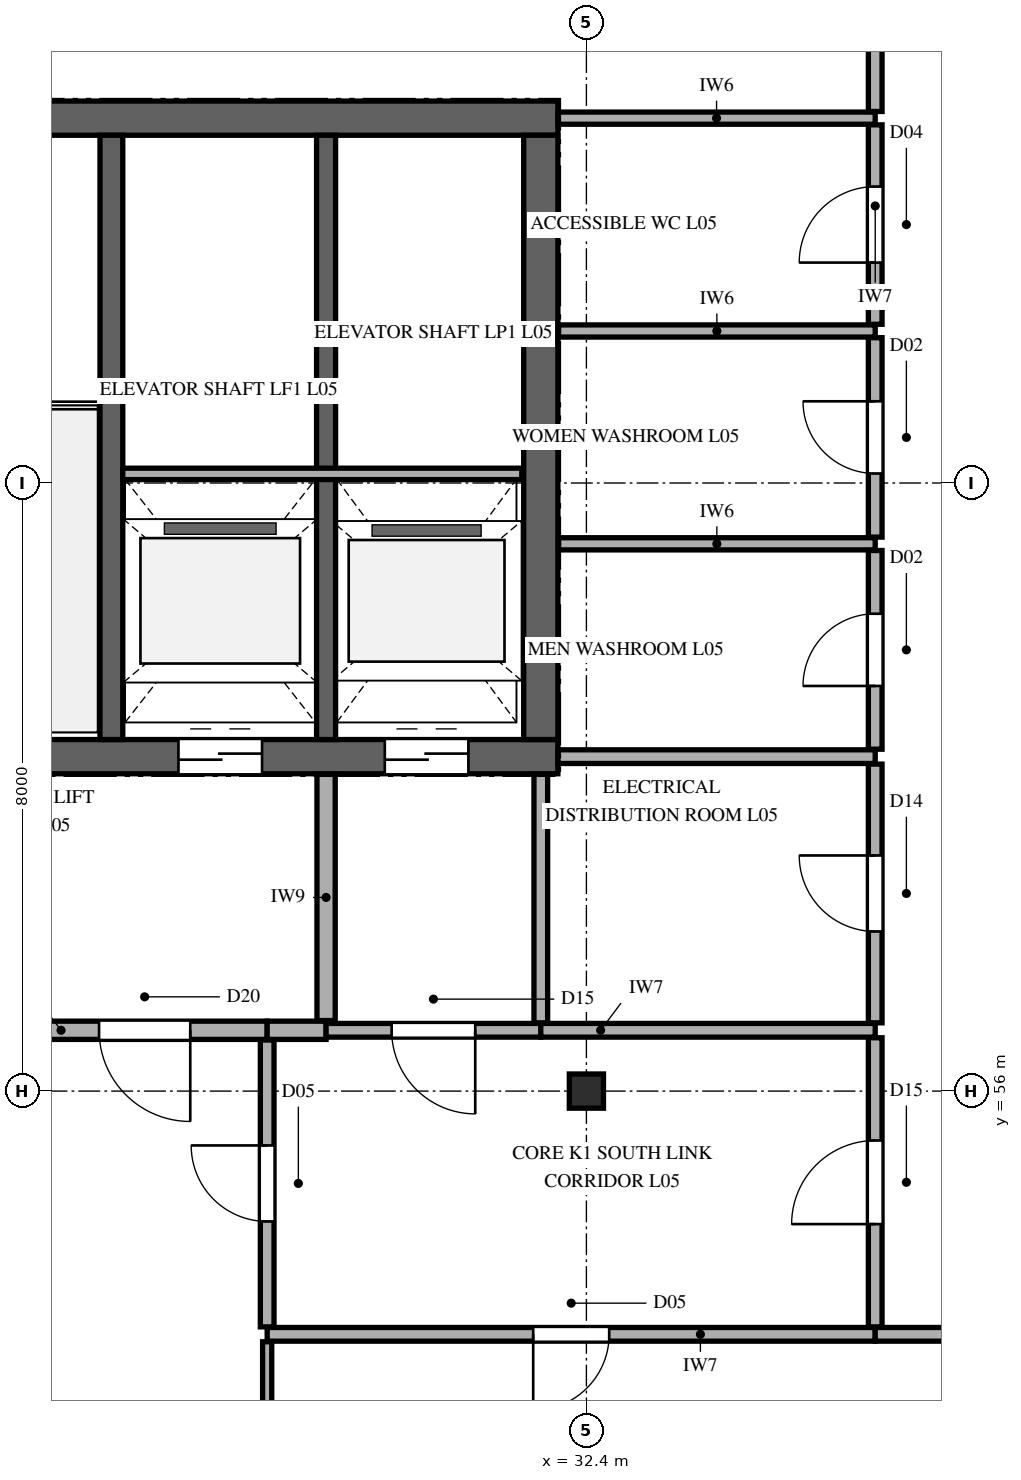
"""IFC4 building model, lengths in metres.
Left out: names, types, materials, properties, quantities, classifications, styles, units other than length and angle.
Written with IfcOpenShell. Run it as: python <this file> out.ifc"""

import sys

from ifc_helpers import new_model, si_unit, direction, frame, frame_2d, origin, origin_2d, place, context, subcontext, project, spatial, rectangle, extrude, element, fill, save


model = new_model("IFC4")
c1 = context("Model", 3, precision=1e-05, world=origin(), true_north=direction((0.0, 1.0)))
c2 = subcontext(c1, "Body", "Model", "MODEL_VIEW")
j1 = project(units=[si_unit("LENGTHUNIT", "METRE"), si_unit("PLANEANGLEUNIT", "RADIAN")], contexts=[c1])
p1 = place(None, origin())
s1 = spatial("IfcSite", under=j1, at=p1, CompositionType="ELEMENT")
p2 = place(p1, origin())
s2 = spatial("IfcBuilding", under=s1, at=p2, CompositionType="ELEMENT")
p3 = place(p2, frame((0.0, 0.0, 24.9)))
s3 = spatial("IfcBuildingStorey", under=s2, at=p3, CompositionType="ELEMENT", Elevation=24.9)
p4 = place(p3, frame((16.36, 60.4, 0.0), z_axis=(0.0, 0.0, 1.0), x_axis=(1.0, 0.0, 0.0)))
e1 = element("IfcWall", 1, at=p4, inside=s3, PredefinedType="SHEAR", context=c2, shape_type="SweptSolid", body=[
    extrude(rectangle(XDim=15.665, YDim=0.45, at=frame_2d((7.833, 0.0))), origin(), (0.0, 0.0, 1.0), 4.2),
])
p5 = place(p4, frame((1.39, 0.0, 0.0)))
e2 = element("IfcOpeningElement", 2, at=p5, cuts=e1, PredefinedType="OPENING", context=c2, shape_type="SweptSolid", body=[
    extrude(rectangle(XDim=1.15, YDim=2.25, at=frame_2d((0.575, 1.125))), frame((0.0, 0.235, 0.0), z_axis=(0.0, -1.0, 0.0), x_axis=(1.0, 0.0, 0.0)), (0.0, 0.0, 1.0), 0.47),
])
p6 = place(p4, frame((10.673, 0.0, 0.0)))
e3 = element("IfcOpeningElement", 3, at=p6, cuts=e1, PredefinedType="OPENING", context=c2, shape_type="SweptSolid", body=[
    extrude(rectangle(XDim=1.1, YDim=2.2, at=frame_2d((0.55, 1.1))), frame((0.0, 0.235, 0.0), z_axis=(0.0, -1.0, 0.0), x_axis=(1.0, 0.0, 0.0)), (0.0, 0.0, 1.0), 0.47),
])
p7 = place(p4, frame((13.387, 0.0, 0.0)))
e4 = element("IfcOpeningElement", 4, at=p7, cuts=e1, PredefinedType="OPENING", context=c2, shape_type="SweptSolid", body=[
    extrude(rectangle(XDim=1.1, YDim=2.2, at=frame_2d((0.55, 1.1))), frame((0.0, 0.235, 0.0), z_axis=(0.0, -1.0, 0.0), x_axis=(1.0, 0.0, 0.0)), (0.0, 0.0, 1.0), 0.47),
])
p8 = place(p3, frame((16.36, 68.8, 0.0), z_axis=(0.0, 0.0, 1.0), x_axis=(1.0, 0.0, 0.0)))
e5 = element("IfcWall", 5, at=p8, inside=s3, PredefinedType="SHEAR", context=c2, shape_type="SweptSolid", body=[
    extrude(rectangle(XDim=15.665, YDim=0.45, at=frame_2d((7.833, 0.0))), origin(), (0.0, 0.0, 1.0), 4.2),
])
p9 = place(p3, frame((31.8, 60.625, 0.0), z_axis=(0.0, 0.0, 1.0), x_axis=(0.0, 1.0, 0.0)))
e6 = element("IfcWall", 6, at=p9, inside=s3, PredefinedType="SHEAR", context=c2, shape_type="SweptSolid", body=[
    extrude(rectangle(XDim=7.95, YDim=0.45, at=frame_2d((3.975, 0.0))), origin(), (0.0, 0.0, 1.0), 4.2),
])
p10 = place(p3, frame((26.15, 60.625, 0.0), z_axis=(0.0, 0.0, 1.0), x_axis=(0.0, 1.0, 0.0)))
e7 = element("IfcWall", 7, at=p10, inside=s3, PredefinedType="SHEAR", context=c2, shape_type="SweptSolid", body=[
    extrude(rectangle(XDim=7.95, YDim=0.3, at=frame_2d((3.975, 0.0))), origin(), (0.0, 0.0, 1.0), 4.2),
])
p11 = place(p3, frame((28.975, 60.625, 0.0), z_axis=(0.0, 0.0, 1.0), x_axis=(0.0, 1.0, 0.0)))
e8 = element("IfcWall", 8, at=p11, inside=s3, PredefinedType="SHEAR", context=c2, shape_type="SweptSolid", body=[
    extrude(rectangle(XDim=7.95, YDim=0.25, at=frame_2d((3.975, 0.0))), origin(), (0.0, 0.0, 1.0), 4.2),
])
p12 = place(p3, frame((32.4, 56.0, 0.0), z_axis=(0.0, 0.0, 1.0), x_axis=(1.0, 0.0, 0.0)))
e9 = element("IfcColumn", 9, at=p12, inside=s3, PredefinedType="COLUMN", context=c2, shape_type="SweptSolid", body=[
    extrude(rectangle(XDim=0.45, YDim=0.45, at=origin_2d()), origin(), (0.0, 0.0, 1.0), 4.2),
])
p13 = place(p3, frame((26.3, 64.12, 0.0), z_axis=(0.0, 0.0, 1.0), x_axis=(1.0, 0.0, 0.0)))
e10 = element("IfcWall", 10, at=p13, inside=s3, PredefinedType="PARTITIONING", context=c2, shape_type="SweptSolid", body=[
    extrude(rectangle(XDim=5.25, YDim=0.15, at=frame_2d((2.625, 0.0))), origin(), (0.0, 0.0, 1.0), 3.96),
])
p14 = place(p3, frame((22.0, 56.8, 0.0), z_axis=(0.0, 0.0, 1.0), x_axis=(1.0, 0.0, 0.0)))
e11 = element("IfcWall", 11, at=p14, inside=s3, PredefinedType="PARTITIONING", context=c2, shape_type="SweptSolid", body=[
    extrude(rectangle(XDim=6.2, YDim=0.24, at=frame_2d((3.1, 0.0))), origin(), (0.0, 0.0, 1.0), 3.96),
])
p15 = place(p14, frame((3.988, 0.0, 0.0)))
e12 = element("IfcOpeningElement", 12, at=p15, cuts=e11, PredefinedType="OPENING", context=c2, shape_type="SweptSolid", body=[
    extrude(rectangle(XDim=1.2, YDim=2.3, at=frame_2d((0.6, 1.15))), frame((0.0, 0.13, 0.0), z_axis=(0.0, -1.0, 0.0), x_axis=(1.0, 0.0, 0.0)), (0.0, 0.0, 1.0), 0.26),
])
p16 = place(p3, frame((28.2, 52.8, 0.0), z_axis=(0.0, 0.0, 1.0), x_axis=(1.0, 0.0, 0.0)))
e13 = element("IfcWall", 13, at=p16, inside=s3, PredefinedType="PARTITIONING", context=c2, shape_type="SweptSolid", body=[
    extrude(rectangle(XDim=8.0, YDim=0.18, at=frame_2d((4.0, 0.0))), origin(), (0.0, 0.0, 1.0), 3.96),
])
p17 = place(p16, frame((3.5, 0.0, 0.0)))
e14 = element("IfcOpeningElement", 14, at=p17, cuts=e13, PredefinedType="OPENING", context=c2, shape_type="SweptSolid", body=[
    extrude(rectangle(XDim=1.0, YDim=2.2, at=frame_2d((0.5, 1.1))), frame((0.0, 0.1, 0.0), z_axis=(0.0, -1.0, 0.0), x_axis=(1.0, 0.0, 0.0)), (0.0, 0.0, 1.0), 0.2),
])
p18 = place(p3, frame((28.2, 56.8, 0.0), z_axis=(0.0, 0.0, 1.0), x_axis=(1.0, 0.0, 0.0)))
e15 = element("IfcWall", 15, at=p18, inside=s3, PredefinedType="PARTITIONING", context=c2, shape_type="SweptSolid", body=[
    extrude(rectangle(XDim=0.775, YDim=0.24, at=frame_2d((0.388, 0.0))), origin(), (0.0, 0.0, 1.0), 3.96),
])
p19 = place(p3, frame((28.975, 56.8, 0.0), z_axis=(0.0, 0.0, 1.0), x_axis=(1.0, 0.0, 0.0)))
e16 = element("IfcWall", 16, at=p19, inside=s3, PredefinedType="PARTITIONING", context=c2, shape_type="SweptSolid", body=[
    extrude(rectangle(XDim=2.825, YDim=0.18, at=frame_2d((1.413, 0.0))), origin(), (0.0, 0.0, 1.0), 3.96),
])
p20 = place(p19, frame((0.863, 0.0, 0.0)))
e17 = element("IfcOpeningElement", 17, at=p20, cuts=e16, PredefinedType="OPENING", context=c2, shape_type="SweptSolid", body=[
    extrude(rectangle(XDim=1.1, YDim=2.2, at=frame_2d((0.55, 1.1))), frame((0.0, 0.1, 0.0), z_axis=(0.0, -1.0, 0.0), x_axis=(1.0, 0.0, 0.0)), (0.0, 0.0, 1.0), 0.2),
])
p21 = place(p3, frame((31.8, 56.8, 0.0), z_axis=(0.0, 0.0, 1.0), x_axis=(1.0, 0.0, 0.0)))
e18 = element("IfcWall", 18, at=p21, inside=s3, PredefinedType="PARTITIONING", context=c2, shape_type="SweptSolid", body=[
    extrude(rectangle(XDim=4.4, YDim=0.18, at=frame_2d((2.2, 0.0))), origin(), (0.0, 0.0, 1.0), 3.96),
])
p22 = place(p3, frame((32.025, 60.4, 0.0), z_axis=(0.0, 0.0, 1.0), x_axis=(1.0, 0.0, 0.0)))
e19 = element("IfcWall", 19, at=p22, inside=s3, PredefinedType="PARTITIONING", context=c2, shape_type="SweptSolid", body=[
    extrude(rectangle(XDim=4.175, YDim=0.18, at=frame_2d((2.087, 0.0))), origin(), (0.0, 0.0, 1.0), 3.96),
])
for number, where, z_axis, x_axis in (
    (20, (32.033, 63.2, 0.0), (0.0, 0.0, 1.0), (1.0, 0.0, 0.0)),
    (21, (32.033, 66.0, 0.0), (0.0, 0.0, 1.0), (1.0, 0.0, 0.0)),
):
    element("IfcWall", number, at=place(p3, frame(where, z_axis=z_axis, x_axis=x_axis)), inside=s3, PredefinedType="PARTITIONING", context=c2, shape_type="SweptSolid", body=[
        extrude(rectangle(XDim=4.167, YDim=0.16, at=frame_2d((2.083, 0.0))), origin(), (0.0, 0.0, 1.0), 3.96),
    ])
p23 = place(p3, frame((32.025, 68.8, 0.0), z_axis=(0.0, 0.0, 1.0), x_axis=(1.0, 0.0, 0.0)))
e22 = element("IfcWall", 22, at=p23, inside=s3, PredefinedType="PARTITIONING", context=c2, shape_type="SweptSolid", body=[
    extrude(rectangle(XDim=4.175, YDim=0.16, at=frame_2d((2.087, 0.0))), origin(), (0.0, 0.0, 1.0), 3.96),
])
p24 = place(p3, frame((36.2, 52.8, 0.0), z_axis=(0.0, 0.0, 1.0), x_axis=(1.0, 0.0, 0.0)))
e23 = element("IfcWall", 23, at=p24, inside=s3, PredefinedType="PARTITIONING", context=c2, shape_type="SweptSolid", body=[
    extrude(rectangle(XDim=3.4, YDim=0.18, at=frame_2d((1.7, 0.0))), origin(), (0.0, 0.0, 1.0), 3.96),
])
p25 = place(p3, frame((28.2, 48.148, 0.0), z_axis=(0.0, 0.0, 1.0), x_axis=(0.0, 1.0, 0.0)))
e24 = element("IfcWall", 24, at=p25, inside=s3, PredefinedType="PARTITIONING", context=c2, shape_type="SweptSolid", body=[
    extrude(rectangle(XDim=4.554, YDim=0.12, at=frame_2d((2.277, 0.0))), origin(), (0.0, 0.0, 1.0), 3.498),
])
p26 = place(p3, frame((28.2, 52.898, 0.0), z_axis=(0.0, 0.0, 1.0), x_axis=(0.0, 1.0, 0.0)))
e25 = element("IfcWall", 25, at=p26, inside=s3, PredefinedType="PARTITIONING", context=c2, shape_type="SweptSolid", body=[
    extrude(rectangle(XDim=3.774, YDim=0.18, at=frame_2d((1.887, 0.0))), origin(), (0.0, 0.0, 1.0), 3.498),
])
p27 = place(p26, frame((1.387, 0.0, 0.0)))
e26 = element("IfcOpeningElement", 26, at=p27, cuts=e25, PredefinedType="OPENING", context=c2, shape_type="SweptSolid", body=[
    extrude(rectangle(XDim=1.0, YDim=2.2, at=frame_2d((0.5, 1.1))), frame((0.0, 0.1, 0.0), z_axis=(0.0, -1.0, 0.0), x_axis=(1.0, 0.0, 0.0)), (0.0, 0.0, 1.0), 0.2),
])
p28 = place(p3, frame((28.975, 56.928, 0.0), z_axis=(0.0, 0.0, 1.0), x_axis=(0.0, 1.0, 0.0)))
e27 = element("IfcWall", 27, at=p28, inside=s3, PredefinedType="PARTITIONING", context=c2, shape_type="SweptSolid", body=[
    extrude(rectangle(XDim=3.239, YDim=0.24, at=frame_2d((1.62, 0.0))), origin(), (0.0, 0.0, 1.0), 3.96),
])
p29 = place(p3, frame((31.8, 56.898, 0.0), z_axis=(0.0, 0.0, 1.0), x_axis=(0.0, 1.0, 0.0)))
e28 = element("IfcWall", 28, at=p29, inside=s3, PredefinedType="PARTITIONING", context=c2, shape_type="SweptSolid", body=[
    extrude(rectangle(XDim=3.269, YDim=0.18, at=frame_2d((1.635, 0.0))), origin(), (0.0, 0.0, 1.0), 3.96),
])
p30 = place(p3, frame((36.2, 52.898, 0.0), z_axis=(0.0, 0.0, 1.0), x_axis=(0.0, 1.0, 0.0)))
e29 = element("IfcWall", 29, at=p30, inside=s3, PredefinedType="PARTITIONING", context=c2, shape_type="SweptSolid", body=[
    extrude(rectangle(XDim=3.804, YDim=0.18, at=frame_2d((1.902, 0.0))), origin(), (0.0, 0.0, 1.0), 3.96),
])
p31 = place(p30, frame((1.352, 0.0, 0.0)))
e30 = element("IfcOpeningElement", 30, at=p31, cuts=e29, PredefinedType="OPENING", context=c2, shape_type="SweptSolid", body=[
    extrude(rectangle(XDim=1.1, YDim=2.2, at=frame_2d((0.55, 1.1))), frame((0.0, 0.1, 0.0), z_axis=(0.0, -1.0, 0.0), x_axis=(1.0, 0.0, 0.0)), (0.0, 0.0, 1.0), 0.2),
])
p32 = place(p3, frame((36.2, 56.898, 0.0), z_axis=(0.0, 0.0, 1.0), x_axis=(0.0, 1.0, 0.0)))
e31 = element("IfcWall", 31, at=p32, inside=s3, PredefinedType="PARTITIONING", context=c2, shape_type="SweptSolid", body=[
    extrude(rectangle(XDim=3.404, YDim=0.18, at=frame_2d((1.702, 0.0))), origin(), (0.0, 0.0, 1.0), 3.96),
])
p33 = place(p32, frame((1.202, 0.0, 0.0)))
e32 = element("IfcOpeningElement", 32, at=p33, cuts=e31, PredefinedType="OPENING", context=c2, shape_type="SweptSolid", body=[
    extrude(rectangle(XDim=1.0, YDim=2.15, at=frame_2d((0.5, 1.075))), frame((0.0, 0.1, 0.0), z_axis=(0.0, -1.0, 0.0), x_axis=(1.0, 0.0, 0.0)), (0.0, 0.0, 1.0), 0.2),
])
p34 = place(p3, frame((36.2, 60.498, 0.0), z_axis=(0.0, 0.0, 1.0), x_axis=(0.0, 1.0, 0.0)))
e33 = element("IfcWall", 33, at=p34, inside=s3, PredefinedType="PARTITIONING", context=c2, shape_type="SweptSolid", body=[
    extrude(rectangle(XDim=2.614, YDim=0.18, at=frame_2d((1.307, 0.0))), origin(), (0.0, 0.0, 1.0), 3.96),
])
p35 = place(p34, frame((0.832, 0.0, 0.0)))
e34 = element("IfcOpeningElement", 34, at=p35, cuts=e33, PredefinedType="OPENING", context=c2, shape_type="SweptSolid", body=[
    extrude(rectangle(XDim=0.95, YDim=2.1, at=frame_2d((0.475, 1.05))), frame((0.0, 0.1, 0.0), z_axis=(0.0, -1.0, 0.0), x_axis=(1.0, 0.0, 0.0)), (0.0, 0.0, 1.0), 0.2),
])
p36 = place(p3, frame((36.2, 63.288, 0.0), z_axis=(0.0, 0.0, 1.0), x_axis=(0.0, 1.0, 0.0)))
e35 = element("IfcWall", 35, at=p36, inside=s3, PredefinedType="PARTITIONING", context=c2, shape_type="SweptSolid", body=[
    extrude(rectangle(XDim=2.624, YDim=0.18, at=frame_2d((1.312, 0.0))), origin(), (0.0, 0.0, 1.0), 3.96),
])
p37 = place(p36, frame((0.837, 0.0, 0.0)))
e36 = element("IfcOpeningElement", 36, at=p37, cuts=e35, PredefinedType="OPENING", context=c2, shape_type="SweptSolid", body=[
    extrude(rectangle(XDim=0.95, YDim=2.1, at=frame_2d((0.475, 1.05))), frame((0.0, 0.1, 0.0), z_axis=(0.0, -1.0, 0.0), x_axis=(1.0, 0.0, 0.0)), (0.0, 0.0, 1.0), 0.2),
])
p38 = place(p3, frame((36.2, 66.088, 0.0), z_axis=(0.0, 0.0, 1.0), x_axis=(0.0, 1.0, 0.0)))
e37 = element("IfcWall", 37, at=p38, inside=s3, PredefinedType="PARTITIONING", context=c2, shape_type="SweptSolid", body=[
    extrude(rectangle(XDim=2.624, YDim=0.18, at=frame_2d((1.312, 0.0))), origin(), (0.0, 0.0, 1.0), 3.96),
])
p39 = place(p38, frame((0.812, 0.0, 0.0)))
e38 = element("IfcOpeningElement", 38, at=p39, cuts=e37, PredefinedType="OPENING", context=c2, shape_type="SweptSolid", body=[
    extrude(rectangle(XDim=1.0, YDim=2.15, at=frame_2d((0.5, 1.075))), frame((0.0, 0.1, 0.0), z_axis=(0.0, -1.0, 0.0), x_axis=(1.0, 0.0, 0.0)), (0.0, 0.0, 1.0), 0.2),
])
p40 = place(p3, frame((36.2, 68.888, 0.0), z_axis=(0.0, 0.0, 1.0), x_axis=(0.0, 1.0, 0.0)))
e39 = element("IfcWall", 39, at=p40, inside=s3, PredefinedType="PARTITIONING", context=c2, shape_type="SweptSolid", body=[
    extrude(rectangle(XDim=13.504, YDim=0.18, at=frame_2d((6.752, 0.0))), origin(), (0.0, 0.0, 1.0), 3.545),
])
p41 = place(p40, frame((6.202, 0.0, 0.0)))
e40 = element("IfcOpeningElement", 40, at=p41, cuts=e39, PredefinedType="OPENING", context=c2, shape_type="SweptSolid", body=[
    extrude(rectangle(XDim=1.1, YDim=2.2, at=frame_2d((0.55, 1.1))), frame((0.0, 0.1, 0.0), z_axis=(0.0, -1.0, 0.0), x_axis=(1.0, 0.0, 0.0)), (0.0, 0.0, 1.0), 0.2),
])
p42 = place(p6, frame((1.1, 0.0, 0.0), z_axis=(0.0, 0.0, 1.0), x_axis=(-1.0, 0.0, 0.0)))
e41 = element("IfcDoor", 41, at=p42, inside=s3, OperationType="DOUBLE_DOOR_SLIDING", PredefinedType="DOOR", context=c2, shape_type="SweptSolid", body=[
    extrude(rectangle(XDim=1.1, YDim=2.2, at=frame_2d((0.55, 1.1))), frame((0.0, 0.025, 0.0), z_axis=(0.0, -1.0, 0.0), x_axis=(1.0, 0.0, 0.0)), (0.0, 0.0, 1.0), 0.05),
])
fill(e3, e41)
p43 = place(p7, frame((1.1, 0.0, 0.0), z_axis=(0.0, 0.0, 1.0), x_axis=(-1.0, 0.0, 0.0)))
e42 = element("IfcDoor", 42, at=p43, inside=s3, OperationType="DOUBLE_DOOR_SLIDING", PredefinedType="DOOR", context=c2, shape_type="SweptSolid", body=[
    extrude(rectangle(XDim=1.1, YDim=2.2, at=frame_2d((0.55, 1.1))), frame((0.0, 0.025, 0.0), z_axis=(0.0, -1.0, 0.0), x_axis=(1.0, 0.0, 0.0)), (0.0, 0.0, 1.0), 0.05),
])
fill(e4, e42)
p44 = place(p15, frame((1.2, 0.0, 0.0), z_axis=(0.0, 0.0, 1.0), x_axis=(-1.0, 0.0, 0.0)))
e43 = element("IfcDoor", 43, at=p44, inside=s3, OperationType="SINGLE_SWING_RIGHT", PredefinedType="DOOR", context=c2, shape_type="SweptSolid", body=[
    extrude(rectangle(XDim=1.2, YDim=2.3, at=frame_2d((0.6, 1.15))), frame((0.0, 0.025, 0.0), z_axis=(0.0, -1.0, 0.0), x_axis=(1.0, 0.0, 0.0)), (0.0, 0.0, 1.0), 0.05),
])
fill(e12, e43)
p45 = place(p17, frame((1.0, 0.0, 0.0), z_axis=(0.0, 0.0, 1.0), x_axis=(-1.0, 0.0, 0.0)))
e44 = element("IfcDoor", 44, at=p45, inside=s3, OperationType="SINGLE_SWING_LEFT", PredefinedType="DOOR", context=c2, shape_type="SweptSolid", body=[
    extrude(rectangle(XDim=1.0, YDim=2.2, at=frame_2d((0.5, 1.1))), frame((0.0, 0.025, 0.0), z_axis=(0.0, -1.0, 0.0), x_axis=(1.0, 0.0, 0.0)), (0.0, 0.0, 1.0), 0.05),
])
fill(e14, e44)
p46 = place(p20, frame((1.1, 0.0, 0.0), z_axis=(0.0, 0.0, 1.0), x_axis=(-1.0, 0.0, 0.0)))
e45 = element("IfcDoor", 45, at=p46, inside=s3, OperationType="SINGLE_SWING_RIGHT", PredefinedType="DOOR", context=c2, shape_type="SweptSolid", body=[
    extrude(rectangle(XDim=1.1, YDim=2.2, at=frame_2d((0.55, 1.1))), frame((0.0, 0.025, 0.0), z_axis=(0.0, -1.0, 0.0), x_axis=(1.0, 0.0, 0.0)), (0.0, 0.0, 1.0), 0.05),
])
fill(e17, e45)
p47 = place(p27, origin())
e46 = element("IfcDoor", 46, at=p47, inside=s3, OperationType="SINGLE_SWING_RIGHT", PredefinedType="DOOR", context=c2, shape_type="SweptSolid", body=[
    extrude(rectangle(XDim=1.0, YDim=2.2, at=frame_2d((0.5, 1.1))), frame((0.0, 0.025, 0.0), z_axis=(0.0, -1.0, 0.0), x_axis=(1.0, 0.0, 0.0)), (0.0, 0.0, 1.0), 0.05),
])
fill(e26, e46)
p48 = place(p31, origin())
e47 = element("IfcDoor", 47, at=p48, inside=s3, OperationType="SINGLE_SWING_LEFT", PredefinedType="DOOR", context=c2, shape_type="SweptSolid", body=[
    extrude(rectangle(XDim=1.1, YDim=2.2, at=frame_2d((0.55, 1.1))), frame((0.0, 0.025, 0.0), z_axis=(0.0, -1.0, 0.0), x_axis=(1.0, 0.0, 0.0)), (0.0, 0.0, 1.0), 0.05),
])
fill(e30, e47)
p49 = place(p33, origin())
e48 = element("IfcDoor", 48, at=p49, inside=s3, OperationType="SINGLE_SWING_RIGHT", PredefinedType="DOOR", context=c2, shape_type="SweptSolid", body=[
    extrude(rectangle(XDim=1.0, YDim=2.15, at=frame_2d((0.5, 1.075))), frame((0.0, 0.025, 0.0), z_axis=(0.0, -1.0, 0.0), x_axis=(1.0, 0.0, 0.0)), (0.0, 0.0, 1.0), 0.05),
])
fill(e32, e48)
p50 = place(p35, origin())
e49 = element("IfcDoor", 49, at=p50, inside=s3, OperationType="SINGLE_SWING_LEFT", PredefinedType="DOOR", context=c2, shape_type="SweptSolid", body=[
    extrude(rectangle(XDim=0.95, YDim=2.1, at=frame_2d((0.475, 1.05))), frame((0.0, 0.025, 0.0), z_axis=(0.0, -1.0, 0.0), x_axis=(1.0, 0.0, 0.0)), (0.0, 0.0, 1.0), 0.05),
])
fill(e34, e49)
p51 = place(p37, origin())
e50 = element("IfcDoor", 50, at=p51, inside=s3, OperationType="SINGLE_SWING_RIGHT", PredefinedType="DOOR", context=c2, shape_type="SweptSolid", body=[
    extrude(rectangle(XDim=0.95, YDim=2.1, at=frame_2d((0.475, 1.05))), frame((0.0, 0.025, 0.0), z_axis=(0.0, -1.0, 0.0), x_axis=(1.0, 0.0, 0.0)), (0.0, 0.0, 1.0), 0.05),
])
fill(e36, e50)
p52 = place(p39, origin())
e51 = element("IfcDoor", 51, at=p52, inside=s3, OperationType="SINGLE_SWING_LEFT", PredefinedType="DOOR", context=c2, shape_type="SweptSolid", body=[
    extrude(rectangle(XDim=1.0, YDim=2.15, at=frame_2d((0.5, 1.075))), frame((0.0, 0.025, 0.0), z_axis=(0.0, -1.0, 0.0), x_axis=(1.0, 0.0, 0.0)), (0.0, 0.0, 1.0), 0.05),
])
fill(e38, e51)
save(model, sys.argv[1])
